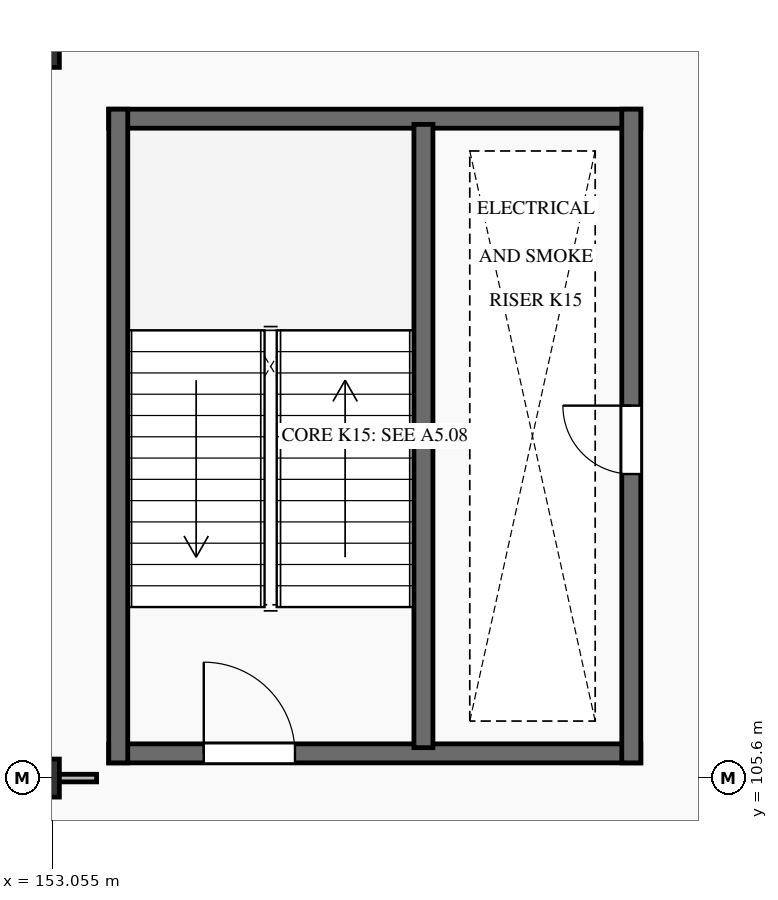
"""IFC4 building model, lengths in metres.
Left out: names, types, materials, properties, quantities, classifications, styles, units other than length and angle.
Written with IfcOpenShell. Run it as: python <this file> out.ifc"""

import sys

from ifc_helpers import new_model, si_unit, direction, frame, frame_2d, origin, origin_2d, place, context, subcontext, project, spatial, rectangle, i_section, extrude, element, fill, save


model = new_model("IFC4")
c1 = context("Model", 3, precision=1e-05, world=origin(), true_north=direction((0.0, 1.0)))
c2 = subcontext(c1, "Body", "Model", "MODEL_VIEW")
j1 = project(units=[si_unit("LENGTHUNIT", "METRE"), si_unit("PLANEANGLEUNIT", "RADIAN")], contexts=[c1])
p1 = place(None, origin())
s1 = spatial("IfcSite", under=j1, at=p1, CompositionType="ELEMENT")
p2 = place(p1, origin())
s2 = spatial("IfcBuilding", under=s1, at=p2, CompositionType="ELEMENT")
p3 = place(p2, frame((0.0, 0.0, 6.0)))
s3 = spatial("IfcBuildingStorey", under=s2, at=p3, CompositionType="ELEMENT", Elevation=6.0)
for number, where, z_axis, x_axis in (
    (1, (153.0, 105.6, 0.0), (0.0, 0.0, 1.0), (1.0, 0.0, 0.0)),
    (2, (153.0, 115.2, 0.0), (0.0, 0.0, 1.0), (1.0, 0.0, 0.0)),
):
    element("IfcColumn", number, at=place(p3, frame(where, z_axis=z_axis, x_axis=x_axis)), inside=s3, PredefinedType="COLUMN", context=c2, shape_type="SweptSolid", body=[
        extrude(i_section(OverallWidth=0.3, OverallDepth=0.5, WebThickness=0.014, FlangeThickness=0.028, FilletRadius=0.027, at=origin_2d()), origin(), (0.0, 0.0, 1.0), 4.8),
    ])
p4 = place(p3, frame((153.8, 105.925, 0.0), z_axis=(0.0, 0.0, 1.0), x_axis=(1.0, 0.0, 0.0)))
e3 = element("IfcWall", 3, at=p4, inside=s3, PredefinedType="SHEAR", context=c2, shape_type="SweptSolid", body=[
    extrude(rectangle(XDim=7.0, YDim=0.25, at=frame_2d((3.5, 0.0))), origin(), (0.0, 0.0, 1.0), 4.8),
])
p5 = place(p4, frame((1.25, 0.0, 0.0)))
e4 = element("IfcOpeningElement", 4, at=p5, cuts=e3, PredefinedType="OPENING", context=c2, shape_type="SweptSolid", body=[
    extrude(rectangle(XDim=1.2, YDim=2.15, at=frame_2d((0.6, 1.075))), frame((0.0, 0.14, 0.0), z_axis=(0.0, -1.0, 0.0), x_axis=(1.0, 0.0, 0.0)), (0.0, 0.0, 1.0), 0.28),
])
p6 = place(p3, frame((153.8, 114.275, 0.0), z_axis=(0.0, 0.0, 1.0), x_axis=(1.0, 0.0, 0.0)))
e5 = element("IfcWall", 5, at=p6, inside=s3, PredefinedType="SHEAR", context=c2, shape_type="SweptSolid", body=[
    extrude(rectangle(XDim=7.0, YDim=0.25, at=frame_2d((3.5, 0.0))), origin(), (0.0, 0.0, 1.0), 4.8),
])
p7 = place(p3, frame((153.925, 105.8, 0.0), z_axis=(0.0, 0.0, 1.0), x_axis=(0.0, 1.0, 0.0)))
e6 = element("IfcWall", 6, at=p7, inside=s3, PredefinedType="SHEAR", context=c2, shape_type="SweptSolid", body=[
    extrude(rectangle(XDim=8.6, YDim=0.25, at=frame_2d((4.3, 0.0))), origin(), (0.0, 0.0, 1.0), 4.8),
])
p8 = place(p3, frame((160.675, 105.8, 0.0), z_axis=(0.0, 0.0, 1.0), x_axis=(0.0, 1.0, 0.0)))
e7 = element("IfcWall", 7, at=p8, inside=s3, PredefinedType="SHEAR", context=c2, shape_type="SweptSolid", body=[
    extrude(rectangle(XDim=8.6, YDim=0.25, at=frame_2d((4.3, 0.0))), origin(), (0.0, 0.0, 1.0), 4.8),
])
p9 = place(p8, frame((3.8, 0.0, 0.0)))
e8 = element("IfcOpeningElement", 8, at=p9, cuts=e7, PredefinedType="OPENING", context=c2, shape_type="SweptSolid", body=[
    extrude(rectangle(XDim=0.9, YDim=2.05, at=frame_2d((0.45, 1.025))), frame((0.0, 0.14, 0.0), z_axis=(0.0, -1.0, 0.0), x_axis=(1.0, 0.0, 0.0)), (0.0, 0.0, 1.0), 0.28),
])
p10 = place(p3, frame((157.94, 106.0, 0.0), z_axis=(0.0, 0.0, 1.0), x_axis=(0.0, 1.0, 0.0)))
e9 = element("IfcWall", 9, at=p10, inside=s3, PredefinedType="SHEAR", context=c2, shape_type="SweptSolid", body=[
    extrude(rectangle(XDim=8.2, YDim=0.25, at=frame_2d((4.1, 0.0))), origin(), (0.0, 0.0, 1.0), 4.8),
])
p11 = place(p3, frame((139.15, 105.6, 0.0), z_axis=(0.0, 0.0, 1.0), x_axis=(1.0, 0.0, 0.0)))
e10 = element("IfcWall", 10, at=p11, inside=s3, PredefinedType="PARTITIONING", context=c2, shape_type="SweptSolid", body=[
    extrude(rectangle(XDim=14.49, YDim=0.1, at=frame_2d((7.245, 0.0))), origin(), (0.0, 0.0, 1.0), 4.23),
])
p12 = place(p11, frame((7.045, 0.0, 0.0)))
e11 = element("IfcOpeningElement", 11, at=p12, cuts=e10, PredefinedType="OPENING", context=c2, shape_type="SweptSolid", body=[
    extrude(rectangle(XDim=1.8, YDim=2.3, at=frame_2d((0.9, 1.15))), frame((0.0, 0.065, 0.0), z_axis=(0.0, -1.0, 0.0), x_axis=(1.0, 0.0, 0.0)), (0.0, 0.0, 1.0), 0.13),
])
p13 = place(p5, origin())
e12 = element("IfcDoor", 12, at=p13, inside=s3, OperationType="SINGLE_SWING_LEFT", PredefinedType="DOOR", context=c2, shape_type="SweptSolid", body=[
    extrude(rectangle(XDim=1.2, YDim=2.15, at=frame_2d((0.6, 1.075))), frame((0.0, 0.025, 0.0), z_axis=(0.0, -1.0, 0.0), x_axis=(1.0, 0.0, 0.0)), (0.0, 0.0, 1.0), 0.05),
])
fill(e4, e12)
p14 = place(p9, origin())
e13 = element("IfcDoor", 13, at=p14, inside=s3, OperationType="SINGLE_SWING_RIGHT", PredefinedType="DOOR", context=c2, shape_type="SweptSolid", body=[
    extrude(rectangle(XDim=0.9, YDim=2.05, at=frame_2d((0.45, 1.025))), frame((0.0, 0.025, 0.0), z_axis=(0.0, -1.0, 0.0), x_axis=(1.0, 0.0, 0.0)), (0.0, 0.0, 1.0), 0.05),
])
fill(e8, e13)
save(model, sys.argv[1])
